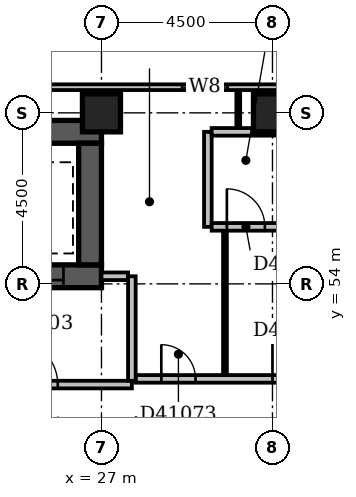
"""IFC4 building model, lengths in metres.
Left out: names, types, materials, properties, quantities, classifications, styles, units other than length and angle.
Written with IfcOpenShell. Run it as: python <this file> out.ifc"""

import sys

from ifc_helpers import new_model, si_unit, direction, frame, frame_2d, origin, origin_2d, place, context, subcontext, project, spatial, rectangle, extrude, element, fill, save


model = new_model("IFC4")
c1 = context("Model", 3, precision=1e-05, world=origin(), true_north=direction((0.0, 1.0)))
c2 = subcontext(c1, "Body", "Model", "MODEL_VIEW")
j1 = project(units=[si_unit("LENGTHUNIT", "METRE"), si_unit("PLANEANGLEUNIT", "RADIAN")], contexts=[c1])
p1 = place(None, origin())
s1 = spatial("IfcSite", under=j1, at=p1, CompositionType="ELEMENT")
p2 = place(p1, origin())
s2 = spatial("IfcBuilding", under=s1, at=p2, CompositionType="ELEMENT")
p3 = place(p2, frame((0.0, 0.0, 162.8)))
s3 = spatial("IfcBuildingStorey", under=s2, at=p3, CompositionType="ELEMENT", Elevation=162.8)
p4 = place(p3, frame((23.9, 54.2, -0.3), z_axis=(0.0, 0.0, 1.0), x_axis=(1.0, 0.0, 0.0)))
e1 = element("IfcWall", 1, at=p4, inside=s3, PredefinedType="SHEAR", context=c2, shape_type="SweptSolid", body=[
    extrude(rectangle(XDim=3.1, YDim=0.6, at=frame_2d((1.55, 0.0))), origin(), (0.0, 0.0, 1.0), 3.6),
])
p5 = place(p4, frame((1.0, 0.0, 0.3)))
e2 = element("IfcOpeningElement", 2, at=p5, cuts=e1, PredefinedType="OPENING", context=c2, shape_type="SweptSolid", body=[
    extrude(rectangle(XDim=1.1, YDim=2.1, at=frame_2d((0.55, 1.05))), frame((0.0, 0.312, 0.0), z_axis=(0.0, -1.0, 0.0), x_axis=(1.0, 0.0, 0.0)), (0.0, 0.0, 1.0), 0.624),
])
p6 = place(p3, frame((23.9, 58.0, -0.3), z_axis=(0.0, 0.0, 1.0), x_axis=(1.0, 0.0, 0.0)))
e3 = element("IfcWall", 3, at=p6, inside=s3, PredefinedType="SHEAR", context=c2, shape_type="SweptSolid", body=[
    extrude(rectangle(XDim=3.1, YDim=0.6, at=frame_2d((1.55, 0.0))), origin(), (0.0, 0.0, 1.0), 3.6),
])
p7 = place(p3, frame((26.7, 54.5, -0.3), z_axis=(0.0, 0.0, 1.0), x_axis=(0.0, 1.0, 0.0)))
e4 = element("IfcWall", 4, at=p7, inside=s3, PredefinedType="SHEAR", context=c2, shape_type="SweptSolid", body=[
    extrude(rectangle(XDim=3.2, YDim=0.6, at=frame_2d((1.6, 0.0))), origin(), (0.0, 0.0, 1.0), 3.6),
])
for number, where, z_axis, x_axis in (
    (5, (27.0, 58.5, -0.3), (0.0, 0.0, 1.0), (1.0, 0.0, 0.0)),
    (6, (31.5, 58.5, -0.3), (0.0, 0.0, 1.0), (1.0, 0.0, 0.0)),
):
    element("IfcColumn", number, at=place(p3, frame(where, z_axis=z_axis, x_axis=x_axis)), inside=s3, PredefinedType="COLUMN", context=c2, shape_type="SweptSolid", body=[
        extrude(rectangle(XDim=1.0, YDim=1.0, at=origin_2d()), origin(), (0.0, 0.0, 1.0), 3.6),
    ])
p8 = place(p3, frame((68.1, 59.175, 0.0), z_axis=(0.0, 0.0, 1.0), x_axis=(-1.0, 0.0, 0.0)))
e7 = element("IfcWall", 7, at=p8, inside=s3, PredefinedType="STANDARD", context=c2, shape_type="SweptSolid", body=[
    extrude(rectangle(XDim=68.85, YDim=0.15, at=frame_2d((34.425, 0.0))), origin(), (0.0, 0.0, 1.0), 2.7),
])
p9 = place(p8, frame((1.65, 0.0, 0.6)))
e8 = element("IfcOpeningElement", 8, at=p9, cuts=e7, PredefinedType="OPENING", context=c2, shape_type="SweptSolid", body=[
    extrude(rectangle(XDim=2.4, YDim=1.8, at=frame_2d((1.2, 0.9))), frame((0.0, 0.087, 0.0), z_axis=(0.0, -1.0, 0.0), x_axis=(1.0, 0.0, 0.0)), (0.0, 0.0, 1.0), 0.174),
])
p10 = place(p8, frame((6.15, 0.0, 0.6)))
e9 = element("IfcOpeningElement", 9, at=p10, cuts=e7, PredefinedType="OPENING", context=c2, shape_type="SweptSolid", body=[
    extrude(rectangle(XDim=2.4, YDim=1.8, at=frame_2d((1.2, 0.9))), frame((0.0, 0.087, 0.0), z_axis=(0.0, -1.0, 0.0), x_axis=(1.0, 0.0, 0.0)), (0.0, 0.0, 1.0), 0.174),
])
p11 = place(p8, frame((37.78, 0.0, 0.6)))
e10 = element("IfcOpeningElement", 10, at=p11, cuts=e7, PredefinedType="OPENING", context=c2, shape_type="SweptSolid", body=[
    extrude(rectangle(XDim=1.2, YDim=1.8, at=frame_2d((0.6, 0.9))), frame((0.0, 0.087, 0.0), z_axis=(0.0, -1.0, 0.0), x_axis=(1.0, 0.0, 0.0)), (0.0, 0.0, 1.0), 0.174),
])
p12 = place(p3, frame((23.0, 51.35, 0.0), z_axis=(0.0, 0.0, 1.0), x_axis=(1.0, 0.0, 0.0)))
e11 = element("IfcWall", 11, at=p12, inside=s3, PredefinedType="PARTITIONING", context=c2, shape_type="SweptSolid", body=[
    extrude(rectangle(XDim=4.8, YDim=0.2, at=frame_2d((2.4, 0.0))), origin(), (0.0, 0.0, 1.0), 3.3),
])
p13 = place(p12, frame((1.65, 0.0, 0.0)))
e12 = element("IfcOpeningElement", 12, at=p13, cuts=e11, PredefinedType="OPENING", context=c2, shape_type="SweptSolid", body=[
    extrude(rectangle(XDim=1.2, YDim=2.1, at=frame_2d((0.6, 1.05))), frame((0.0, 0.112, 0.0), z_axis=(0.0, -1.0, 0.0), x_axis=(1.0, 0.0, 0.0)), (0.0, 0.0, 1.0), 0.224),
])
p14 = place(p3, frame((27.8, 51.45, 0.0), z_axis=(0.0, 0.0, 1.0), x_axis=(0.0, 1.0, 0.0)))
e13 = element("IfcWall", 13, at=p14, inside=s3, PredefinedType="PARTITIONING", context=c2, shape_type="SweptSolid", body=[
    extrude(rectangle(XDim=2.75, YDim=0.2, at=frame_2d((1.375, 0.0))), origin(), (0.0, 0.0, 1.0), 3.3),
])
p15 = place(p3, frame((27.0, 54.2, 0.0), z_axis=(0.0, 0.0, 1.0), x_axis=(1.0, 0.0, 0.0)))
e14 = element("IfcWall", 14, at=p15, inside=s3, PredefinedType="PARTITIONING", context=c2, shape_type="SweptSolid", body=[
    extrude(rectangle(XDim=0.7, YDim=0.2, at=frame_2d((0.35, 0.0))), origin(), (0.0, 0.0, 1.0), 3.3),
])
p16 = place(p3, frame((27.9, 51.5, 0.0), z_axis=(0.0, 0.0, 1.0), x_axis=(1.0, 0.0, 0.0)))
e15 = element("IfcWall", 15, at=p16, inside=s3, PredefinedType="PARTITIONING", context=c2, shape_type="SweptSolid", body=[
    extrude(rectangle(XDim=9.3, YDim=0.2, at=frame_2d((4.65, 0.0))), origin(), (0.0, 0.0, 1.0), 3.3),
])
p17 = place(p16, frame((0.675, 0.0, 0.0)))
e16 = element("IfcOpeningElement", 16, at=p17, cuts=e15, PredefinedType="OPENING", context=c2, shape_type="SweptSolid", body=[
    extrude(rectangle(XDim=0.9, YDim=2.1, at=frame_2d((0.45, 1.05))), frame((0.0, 0.112, 0.0), z_axis=(0.0, -1.0, 0.0), x_axis=(1.0, 0.0, 0.0)), (0.0, 0.0, 1.0), 0.224),
])
p18 = place(p16, frame((3.6, 0.0, 0.0)))
e17 = element("IfcOpeningElement", 17, at=p18, cuts=e15, PredefinedType="OPENING", context=c2, shape_type="SweptSolid", body=[
    extrude(rectangle(XDim=1.0, YDim=2.1, at=frame_2d((0.5, 1.05))), frame((0.0, 0.112, 0.0), z_axis=(0.0, -1.0, 0.0), x_axis=(1.0, 0.0, 0.0)), (0.0, 0.0, 1.0), 0.224),
])
p19 = place(p16, frame((7.125, 0.0, 0.0)))
e18 = element("IfcOpeningElement", 18, at=p19, cuts=e15, PredefinedType="OPENING", context=c2, shape_type="SweptSolid", body=[
    extrude(rectangle(XDim=1.0, YDim=2.1, at=frame_2d((0.5, 1.05))), frame((0.0, 0.112, 0.0), z_axis=(0.0, -1.0, 0.0), x_axis=(1.0, 0.0, 0.0)), (0.0, 0.0, 1.0), 0.224),
])
p20 = place(p3, frame((30.25, 51.6, 0.0), z_axis=(0.0, 0.0, 1.0), x_axis=(0.0, 1.0, 0.0)))
e19 = element("IfcWall", 19, at=p20, inside=s3, PredefinedType="PARTITIONING", context=c2, shape_type="SweptSolid", body=[
    extrude(rectangle(XDim=3.8, YDim=0.1, at=frame_2d((1.9, 0.0))), origin(), (0.0, 0.0, 1.0), 3.3),
])
p21 = place(p3, frame((29.8, 55.5, 0.0), z_axis=(0.0, 0.0, 1.0), x_axis=(0.0, 1.0, 0.0)))
e20 = element("IfcWall", 20, at=p21, inside=s3, PredefinedType="PARTITIONING", context=c2, shape_type="SweptSolid", body=[
    extrude(rectangle(XDim=2.5, YDim=0.2, at=frame_2d((1.25, 0.0))), origin(), (0.0, 0.0, 1.0), 3.3),
])
p22 = place(p3, frame((29.9, 55.5, 0.0), z_axis=(0.0, 0.0, 1.0), x_axis=(1.0, 0.0, 0.0)))
e21 = element("IfcWall", 21, at=p22, inside=s3, PredefinedType="PARTITIONING", context=c2, shape_type="SweptSolid", body=[
    extrude(rectangle(XDim=1.8, YDim=0.2, at=frame_2d((0.9, 0.0))), origin(), (0.0, 0.0, 1.0), 3.3),
])
p23 = place(p22, frame((0.4, 0.0, 0.0)))
e22 = element("IfcOpeningElement", 22, at=p23, cuts=e21, PredefinedType="OPENING", context=c2, shape_type="SweptSolid", body=[
    extrude(rectangle(XDim=1.0, YDim=2.1, at=frame_2d((0.5, 1.05))), frame((0.0, 0.112, 0.0), z_axis=(0.0, -1.0, 0.0), x_axis=(1.0, 0.0, 0.0)), (0.0, 0.0, 1.0), 0.224),
])
p24 = place(p3, frame((29.9, 58.0, 0.0), z_axis=(0.0, 0.0, 1.0), x_axis=(1.0, 0.0, 0.0)))
e23 = element("IfcWall", 23, at=p24, inside=s3, PredefinedType="PARTITIONING", context=c2, shape_type="SweptSolid", body=[
    extrude(rectangle(XDim=1.8, YDim=0.2, at=frame_2d((0.9, 0.0))), origin(), (0.0, 0.0, 1.0), 3.3),
])
p25 = place(p3, frame((30.6, 58.1, 0.0), z_axis=(0.0, 0.0, 1.0), x_axis=(0.0, 1.0, 0.0)))
e24 = element("IfcWall", 24, at=p25, inside=s3, PredefinedType="PARTITIONING", context=c2, shape_type="SweptSolid", body=[
    extrude(rectangle(XDim=1.0, YDim=0.1, at=frame_2d((0.5, 0.0))), origin(), (0.0, 0.0, 1.0), 3.3),
])
p26 = place(p11, origin())
e25 = element("IfcWindow", 25, at=p26, inside=s3, PartitioningType="SINGLE_PANEL", PredefinedType="WINDOW", context=c2, shape_type="SweptSolid", body=[
    extrude(rectangle(XDim=1.2, YDim=1.8, at=frame_2d((0.6, 0.9))), frame((0.0, 0.03, 0.0), z_axis=(0.0, -1.0, 0.0), x_axis=(1.0, 0.0, 0.0)), (0.0, 0.0, 1.0), 0.06),
])
fill(e10, e25)
p27 = place(p13, origin())
e26 = element("IfcDoor", 26, at=p27, inside=s3, OperationType="SINGLE_SWING_LEFT", PredefinedType="DOOR", context=c2, shape_type="SweptSolid", body=[
    extrude(rectangle(XDim=1.2, YDim=2.1, at=frame_2d((0.6, 1.05))), frame((0.0, 0.025, 0.0), z_axis=(0.0, -1.0, 0.0), x_axis=(1.0, 0.0, 0.0)), (0.0, 0.0, 1.0), 0.05),
])
fill(e12, e26)
p28 = place(p5, origin())
e27 = element("IfcDoor", 27, at=p28, inside=s3, OperationType="SLIDING_TO_LEFT", PredefinedType="DOOR", context=c2, shape_type="SweptSolid", body=[
    extrude(rectangle(XDim=1.1, YDim=2.1, at=frame_2d((0.55, 1.05))), frame((0.0, 0.025, 0.0), z_axis=(0.0, -1.0, 0.0), x_axis=(1.0, 0.0, 0.0)), (0.0, 0.0, 1.0), 0.05),
])
fill(e2, e27)
p29 = place(p17, origin())
e28 = element("IfcDoor", 28, at=p29, inside=s3, OperationType="SINGLE_SWING_LEFT", PredefinedType="DOOR", context=c2, shape_type="SweptSolid", body=[
    extrude(rectangle(XDim=0.9, YDim=2.1, at=frame_2d((0.45, 1.05))), frame((0.0, 0.025, 0.0), z_axis=(0.0, -1.0, 0.0), x_axis=(1.0, 0.0, 0.0)), (0.0, 0.0, 1.0), 0.05),
])
fill(e16, e28)
p30 = place(p18, origin())
e29 = element("IfcDoor", 29, at=p30, inside=s3, OperationType="SINGLE_SWING_LEFT", PredefinedType="DOOR", context=c2, shape_type="SweptSolid", body=[
    extrude(rectangle(XDim=1.0, YDim=2.1, at=frame_2d((0.5, 1.05))), frame((0.0, 0.025, 0.0), z_axis=(0.0, -1.0, 0.0), x_axis=(1.0, 0.0, 0.0)), (0.0, 0.0, 1.0), 0.05),
])
fill(e17, e29)
p31 = place(p23, origin())
e30 = element("IfcDoor", 30, at=p31, inside=s3, OperationType="SINGLE_SWING_LEFT", PredefinedType="DOOR", context=c2, shape_type="SweptSolid", body=[
    extrude(rectangle(XDim=1.0, YDim=2.1, at=frame_2d((0.5, 1.05))), frame((0.0, 0.025, 0.0), z_axis=(0.0, -1.0, 0.0), x_axis=(1.0, 0.0, 0.0)), (0.0, 0.0, 1.0), 0.05),
])
fill(e22, e30)
save(model, sys.argv[1])
